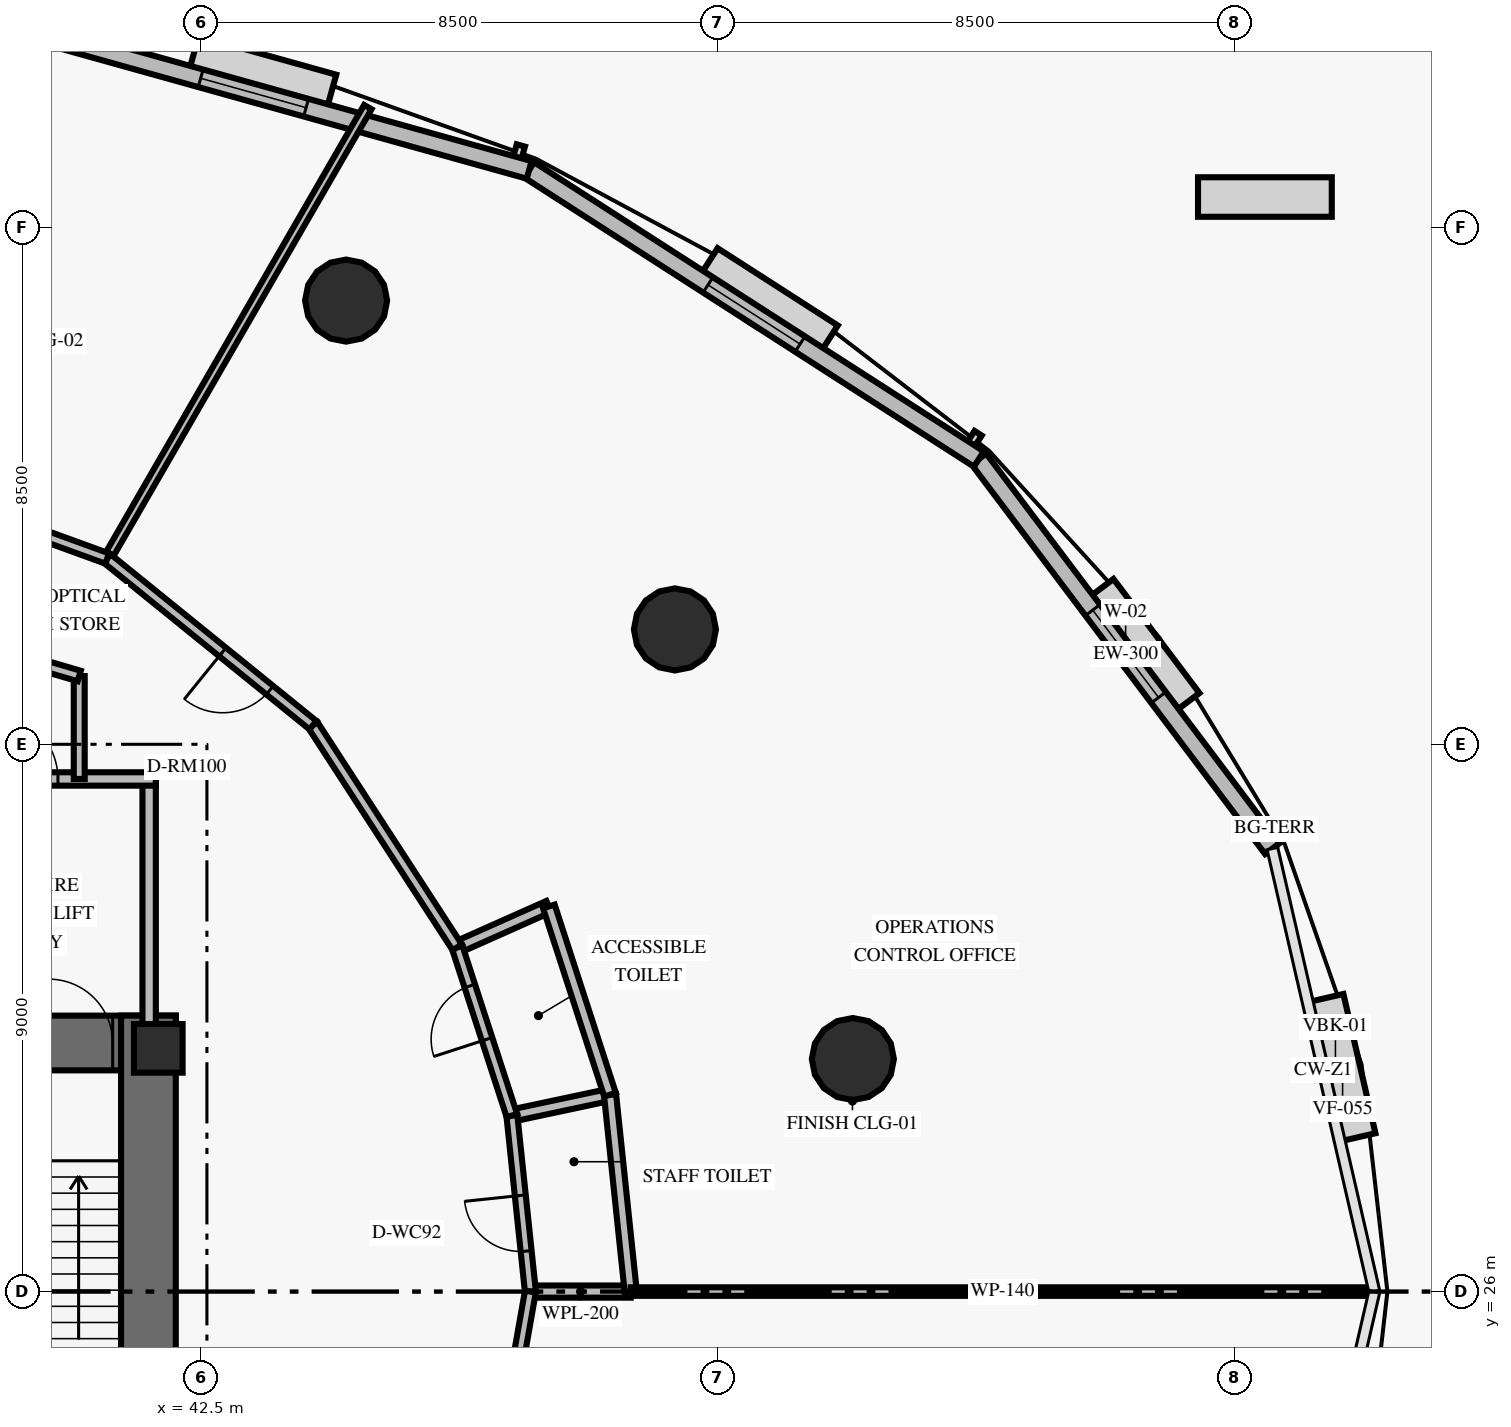
"""IFC4 building model, lengths in metres.
Left out: names, types, materials, properties, quantities, classifications, styles, units other than length and angle.
Written with IfcOpenShell. Run it as: python <this file> out.ifc"""

import sys

from ifc_helpers import new_model, si_unit, direction, frame, frame_2d, origin, origin_2d, place, context, subcontext, project, spatial, rectangle, circle, extrude, element, fill, save


model = new_model("IFC4")
c1 = context("Model", 3, precision=1e-05, world=origin(), true_north=direction((0.0, 1.0)))
c2 = subcontext(c1, "Body", "Model", "MODEL_VIEW")
j1 = project(units=[si_unit("LENGTHUNIT", "METRE"), si_unit("PLANEANGLEUNIT", "RADIAN")], contexts=[c1])
p1 = place(None, origin())
s1 = spatial("IfcSite", under=j1, at=p1, CompositionType="ELEMENT")
p2 = place(p1, origin())
s2 = spatial("IfcBuilding", under=s1, at=p2, CompositionType="ELEMENT")
p3 = place(p2, frame((0.0, 0.0, 30.0)))
s3 = spatial("IfcBuildingStorey", under=s2, at=p3, CompositionType="ELEMENT", Elevation=30.0)
p4 = place(p3, frame((25.922, 30.088, 0.0), z_axis=(0.0, 0.0, 1.0), x_axis=(1.0, 0.0, 0.0)))
e1 = element("IfcWall", 1, at=p4, inside=s3, PredefinedType="SHEAR", context=c2, shape_type="SweptSolid", body=[
    extrude(rectangle(XDim=16.166, YDim=0.9, at=frame_2d((8.083, 0.0))), origin(), (0.0, 0.0, 1.0), 4.2),
])
p5 = place(p4, frame((1.028, 0.0, 0.0)))
e2 = element("IfcOpeningElement", 2, at=p5, cuts=e1, PredefinedType="OPENING", context=c2, shape_type="SweptSolid", body=[
    extrude(rectangle(XDim=1.05, YDim=2.15, at=frame_2d((0.525, 1.075))), frame((0.0, 0.46, 0.0), z_axis=(0.0, -1.0, 0.0), x_axis=(1.0, 0.0, 0.0)), (0.0, 0.0, 1.0), 0.92),
])
p6 = place(p4, frame((14.078, 0.0, 0.0)))
e3 = element("IfcOpeningElement", 3, at=p6, cuts=e1, PredefinedType="OPENING", context=c2, shape_type="SweptSolid", body=[
    extrude(rectangle(XDim=1.05, YDim=2.15, at=frame_2d((0.525, 1.075))), frame((0.0, 0.46, 0.0), z_axis=(0.0, -1.0, 0.0), x_axis=(1.0, 0.0, 0.0)), (0.0, 0.0, 1.0), 0.92),
])
p7 = place(p4, frame((7.528, 0.0, 0.0)))
e4 = element("IfcOpeningElement", 4, at=p7, cuts=e1, PredefinedType="OPENING", context=c2, shape_type="SweptSolid", body=[
    extrude(rectangle(XDim=1.1, YDim=2.15, at=frame_2d((0.55, 1.075))), frame((0.0, 0.46, 0.0), z_axis=(0.0, -1.0, 0.0), x_axis=(1.0, 0.0, 0.0)), (0.0, 0.0, 1.0), 0.92),
])
p8 = place(p3, frame((41.638, 19.662, 0.0), z_axis=(0.0, 0.0, 1.0), x_axis=(0.0, 1.0, 0.0)))
e5 = element("IfcWall", 5, at=p8, inside=s3, PredefinedType="SHEAR", context=c2, shape_type="SweptSolid", body=[
    extrude(rectangle(XDim=10.876, YDim=0.9, at=frame_2d((5.438, 0.0))), origin(), (0.0, 0.0, 1.0), 4.2),
])
p9 = place(p3, frame((41.8, 30.0, 0.0), z_axis=(0.0, 0.0, 1.0), x_axis=(1.0, 0.0, 0.0)))
e6 = element("IfcColumn", 6, at=p9, inside=s3, PredefinedType="PILASTER", context=c2, shape_type="SweptSolid", body=[
    extrude(rectangle(XDim=0.8, YDim=0.8, at=origin_2d()), origin(), (0.0, 0.0, 1.0), 4.2),
])
for number, where, z_axis, x_axis in (
    (7, (53.223, 29.824, 0.0), (0.0, 0.0, 1.0), (1.0, 0.0, 0.0)),
    (8, (50.297, 36.889, 0.0), (0.0, 0.0, 1.0), (1.0, 0.0, 0.0)),
):
    element("IfcColumn", number, at=place(p3, frame(where, z_axis=z_axis, x_axis=x_axis)), inside=s3, PredefinedType="COLUMN", context=c2, shape_type="SweptSolid", body=[
        extrude(circle(Radius=0.675, at=origin_2d()), origin(), (0.0, 0.0, 1.0), 4.2),
    ])
p10 = place(p3, frame((44.889, 42.297, -0.28), z_axis=(0.0, 0.0, 1.0), x_axis=(1.0, 0.0, 0.0)))
e9 = element("IfcColumn", 9, at=p10, inside=s3, PredefinedType="COLUMN", context=c2, shape_type="SweptSolid", body=[
    extrude(circle(Radius=0.675, at=origin_2d()), origin(), (0.0, 0.0, 1.0), 4.48),
])
p11 = place(p3, frame((60.124, 33.285, 0.0), z_axis=(0.0, 0.0, 1.0), x_axis=(-0.601814793535, 0.798635683076, 0.0)))
e10 = element("IfcWall", 10, at=p11, inside=s3, PredefinedType="SOLIDWALL", context=c2, shape_type="SweptSolid", body=[
    extrude(rectangle(XDim=8.022, YDim=0.3, at=frame_2d((4.011, 0.0))), origin(), (0.0, 0.0, 1.0), 3.0),
])
p12 = place(p11, frame((3.111, 0.0, 0.8)))
e11 = element("IfcOpeningElement", 11, at=p12, cuts=e10, PredefinedType="OPENING", context=c2, shape_type="SweptSolid", body=[
    extrude(rectangle(XDim=1.8, YDim=1.95, at=frame_2d((0.9, 0.975))), frame((0.0, 0.16, 0.0), z_axis=(0.0, -1.0, 0.0), x_axis=(1.0, 0.0, 0.0)), (0.0, 0.0, 1.0), 0.32),
])
p13 = place(p3, frame((55.296, 39.691, 0.0), z_axis=(0.0, 0.0, 1.0), x_axis=(-0.841162236031, 0.540782851685, 0.0)))
e12 = element("IfcWall", 12, at=p13, inside=s3, PredefinedType="SOLIDWALL", context=c2, shape_type="SweptSolid", body=[
    extrude(rectangle(XDim=8.792, YDim=0.3, at=frame_2d((4.396, 0.0))), origin(), (0.0, 0.0, 1.0), 3.0),
])
p14 = place(p13, frame((3.496, 0.0, 0.8)))
e13 = element("IfcOpeningElement", 13, at=p14, cuts=e12, PredefinedType="OPENING", context=c2, shape_type="SweptSolid", body=[
    extrude(rectangle(XDim=1.8, YDim=1.95, at=frame_2d((0.9, 0.975))), frame((0.0, 0.16, 0.0), z_axis=(0.0, -1.0, 0.0), x_axis=(1.0, 0.0, 0.0)), (0.0, 0.0, 1.0), 0.32),
])
p15 = place(p3, frame((47.9, 44.446, 0.0), z_axis=(0.0, 0.0, 1.0), x_axis=(-0.963246695545, 0.268618323133, 0.0)))
e14 = element("IfcWall", 14, at=p15, inside=s3, PredefinedType="SOLIDWALL", context=c2, shape_type="SweptSolid", body=[
    extrude(rectangle(XDim=9.419, YDim=0.3, at=frame_2d((4.709, 0.0))), origin(), (0.0, 0.0, 1.0), 3.0),
])
p16 = place(p15, frame((3.809, 0.0, 0.8)))
e15 = element("IfcOpeningElement", 15, at=p16, cuts=e14, PredefinedType="OPENING", context=c2, shape_type="SweptSolid", body=[
    extrude(rectangle(XDim=1.8, YDim=1.95, at=frame_2d((0.9, 0.975))), frame((0.0, 0.16, 0.0), z_axis=(0.0, -1.0, 0.0), x_axis=(1.0, 0.0, 0.0)), (0.0, 0.0, 1.0), 0.32),
])
p17 = place(p3, frame((41.65, 30.05, 0.0), z_axis=(0.0, 0.0, 1.0), x_axis=(0.0, 1.0, 0.0)))
e16 = element("IfcWall", 16, at=p17, inside=s3, PredefinedType="SOLIDWALL", context=c2, shape_type="SweptSolid", body=[
    extrude(rectangle(XDim=4.38, YDim=0.22, at=frame_2d((2.19, 0.0))), origin(), (0.0, 0.0, 1.0), 2.67),
])
p18 = place(p3, frame((37.45, 34.43, 0.0), z_axis=(0.0, 0.0, 1.0), x_axis=(1.0, 0.0, 0.0)))
e17 = element("IfcWall", 17, at=p18, inside=s3, PredefinedType="SOLIDWALL", context=c2, shape_type="SweptSolid", body=[
    extrude(rectangle(XDim=4.31, YDim=0.22, at=frame_2d((2.155, 0.0))), origin(), (0.0, 0.0, 1.0), 2.67),
])
p19 = place(p18, frame((1.6, 0.0, 0.0)))
e18 = element("IfcOpeningElement", 18, at=p19, cuts=e17, PredefinedType="OPENING", context=c2, shape_type="SweptSolid", body=[
    extrude(rectangle(XDim=1.1, YDim=2.15, at=frame_2d((0.55, 1.075))), frame((0.0, 0.12, 0.0), z_axis=(0.0, -1.0, 0.0), x_axis=(1.0, 0.0, 0.0)), (0.0, 0.0, 1.0), 0.24),
])
p20 = place(p3, frame((40.5, 36.123, 0.0), z_axis=(0.0, 0.0, 1.0), x_axis=(0.0, -1.0, 0.0)))
e19 = element("IfcWall", 19, at=p20, inside=s3, PredefinedType="PARTITIONING", context=c2, shape_type="SweptSolid", body=[
    extrude(rectangle(XDim=1.693, YDim=0.18, at=frame_2d((0.846, 0.0))), origin(), (0.0, 0.0, 1.0), 2.67),
])
p21 = place(p3, frame((34.0, 38.03, 0.0), z_axis=(0.0, 0.0, 1.0), x_axis=(0.959546654541, -0.281549671923, 0.0)))
e20 = element("IfcWall", 20, at=p21, inside=s3, PredefinedType="PARTITIONING", context=c2, shape_type="SweptSolid", body=[
    extrude(rectangle(XDim=6.774, YDim=0.18, at=frame_2d((3.387, 0.0))), origin(), (0.0, 0.0, 1.0), 2.67),
])
p22 = place(p21, frame((2.837, 0.0, 0.0)))
e21 = element("IfcOpeningElement", 21, at=p22, cuts=e20, PredefinedType="OPENING", context=c2, shape_type="SweptSolid", body=[
    extrude(rectangle(XDim=1.1, YDim=2.15, at=frame_2d((0.55, 1.075))), frame((0.0, 0.1, 0.0), z_axis=(0.0, -1.0, 0.0), x_axis=(1.0, 0.0, 0.0)), (0.0, 0.0, 1.0), 0.2),
])
for number, where, z_axis, x_axis in (
    (22, (47.92, 26.0, 0.0), (0.0, 0.0, 1.0), (1.0, 0.0, 0.0)),
    (23, (47.616, 28.894, 0.0), (0.0, 0.0, 1.0), (0.978, 0.208, 0.0)),
):
    element("IfcWall", number, at=place(p3, frame(where, z_axis=z_axis, x_axis=x_axis)), inside=s3, PredefinedType="PLUMBINGWALL", context=c2, shape_type="SweptSolid", body=[
        extrude(rectangle(XDim=1.65, YDim=0.2, at=frame_2d((0.825, 0.0))), origin(), (0.0, 0.0, 1.0), 2.67),
    ])
p23 = place(p3, frame((49.57, 26.0, 0.0), z_axis=(0.0, 0.0, 1.0), x_axis=(-0.104552041268, 0.994519416938, 0.0)))
e24 = element("IfcWall", 24, at=p23, inside=s3, PredefinedType="PLUMBINGWALL", context=c2, shape_type="SweptSolid", body=[
    extrude(rectangle(XDim=3.255, YDim=0.2, at=frame_2d((1.627, 0.0))), origin(), (0.0, 0.0, 1.0), 2.67),
])
p24 = place(p3, frame((47.92, 26.0, 0.0), z_axis=(0.0, 0.0, 1.0), x_axis=(-0.104536296253, 0.994521072057, 0.0)))
e25 = element("IfcWall", 25, at=p24, inside=s3, PredefinedType="PARTITIONING", context=c2, shape_type="SweptSolid", body=[
    extrude(rectangle(XDim=2.91, YDim=0.18, at=frame_2d((1.455, 0.0))), origin(), (0.0, 0.0, 1.0), 2.67),
])
p25 = place(p24, frame((0.669, 0.0, 0.0)))
e26 = element("IfcOpeningElement", 26, at=p25, cuts=e25, PredefinedType="OPENING", context=c2, shape_type="SweptSolid", body=[
    extrude(rectangle(XDim=0.92, YDim=2.1, at=frame_2d((0.46, 1.05))), frame((0.0, 0.1, 0.0), z_axis=(0.0, -1.0, 0.0), x_axis=(1.0, 0.0, 0.0)), (0.0, 0.0, 1.0), 0.2),
])
p26 = place(p3, frame((46.717, 31.662, 0.0), z_axis=(0.0, 0.0, 1.0), x_axis=(0.913536765304, 0.406756165828, 0.0)))
e27 = element("IfcWall", 27, at=p26, inside=s3, PredefinedType="PLUMBINGWALL", context=c2, shape_type="SweptSolid", body=[
    extrude(rectangle(XDim=1.65, YDim=0.2, at=frame_2d((0.825, 0.0))), origin(), (0.0, 0.0, 1.0), 2.67),
])
p27 = place(p3, frame((49.23, 29.237, 0.0), z_axis=(0.0, 0.0, 1.0), x_axis=(-0.309018232614, 0.951056113966, 0.0)))
e28 = element("IfcWall", 28, at=p27, inside=s3, PredefinedType="PLUMBINGWALL", context=c2, shape_type="SweptSolid", body=[
    extrude(rectangle(XDim=3.255, YDim=0.2, at=frame_2d((1.627, 0.0))), origin(), (0.0, 0.0, 1.0), 2.67),
])
p28 = place(p3, frame((47.616, 28.894, 0.0), z_axis=(0.0, 0.0, 1.0), x_axis=(-0.308970358399, 0.951071667978, 0.0)))
e29 = element("IfcWall", 29, at=p28, inside=s3, PredefinedType="PARTITIONING", context=c2, shape_type="SweptSolid", body=[
    extrude(rectangle(XDim=2.91, YDim=0.18, at=frame_2d((1.455, 0.0))), origin(), (0.0, 0.0, 1.0), 2.67),
])
p29 = place(p28, frame((1.321, 0.0, 0.0)))
e30 = element("IfcOpeningElement", 30, at=p29, cuts=e29, PredefinedType="OPENING", context=c2, shape_type="SweptSolid", body=[
    extrude(rectangle(XDim=0.92, YDim=2.1, at=frame_2d((0.46, 1.05))), frame((0.0, 0.1, 0.0), z_axis=(0.0, -1.0, 0.0), x_axis=(1.0, 0.0, 0.0)), (0.0, 0.0, 1.0), 0.2),
])
p30 = place(p3, frame((49.57, 26.0, 0.0), z_axis=(0.0, 0.0, 1.0), x_axis=(1.0, 0.0, 0.0)))
e31 = element("IfcWall", 31, at=p30, inside=s3, PredefinedType="PARTITIONING", context=c2, shape_type="SweptSolid", body=[
    extrude(rectangle(XDim=12.23, YDim=0.14, at=frame_2d((6.115, 0.0))), origin(), (0.0, 0.0, 1.0), 2.67),
])
p31 = place(p3, frame((40.96, 38.055, 0.0), z_axis=(0.0, 0.0, 1.0), x_axis=(0.500007596729, 0.866021017767, 0.0)))
e32 = element("IfcWall", 32, at=p31, inside=s3, PredefinedType="PARTITIONING", context=c2, shape_type="SweptSolid", body=[
    extrude(rectangle(XDim=8.573, YDim=0.14, at=frame_2d((4.286, 0.0))), origin(), (0.0, 0.0, 1.0), 2.67),
])
p32 = place(p3, frame((46.717, 31.662, 0.0), z_axis=(0.0, 0.0, 1.0), x_axis=(-0.544673039571, 0.838648484148, 0.0)))
e33 = element("IfcWall", 33, at=p32, inside=s3, PredefinedType="PARTITIONING", context=c2, shape_type="SweptSolid", body=[
    extrude(rectangle(XDim=4.355, YDim=0.18, at=frame_2d((2.177, 0.0))), origin(), (0.0, 0.0, 1.0), 2.67),
])
p33 = place(p3, frame((44.344, 35.314, 0.0), z_axis=(0.0, 0.0, 1.0), x_axis=(-0.777119533123, 0.629353025923, 0.0)))
e34 = element("IfcWall", 34, at=p33, inside=s3, PredefinedType="PARTITIONING", context=c2, shape_type="SweptSolid", body=[
    extrude(rectangle(XDim=4.355, YDim=0.18, at=frame_2d((2.178, 0.0))), origin(), (0.0, 0.0, 1.0), 2.67),
])
p34 = place(p33, frame((0.914, 0.0, 0.0)))
e35 = element("IfcOpeningElement", 35, at=p34, cuts=e34, PredefinedType="OPENING", context=c2, shape_type="SweptSolid", body=[
    extrude(rectangle(XDim=1.0, YDim=2.15, at=frame_2d((0.5, 1.075))), frame((0.0, 0.1, 0.0), z_axis=(0.0, -1.0, 0.0), x_axis=(1.0, 0.0, 0.0)), (0.0, 0.0, 1.0), 0.2),
])
p35 = place(p3, frame((40.96, 38.055, 0.0), z_axis=(0.0, 0.0, 1.0), x_axis=(-0.939699018122, 0.342002566277, 0.0)))
e36 = element("IfcWall", 36, at=p35, inside=s3, PredefinedType="PARTITIONING", context=c2, shape_type="SweptSolid", body=[
    extrude(rectangle(XDim=4.834, YDim=0.18, at=frame_2d((2.417, 0.0))), origin(), (0.0, 0.0, 1.0), 2.67),
])
p36 = place(p3, frame((47.081, 21.239, 0.0), z_axis=(0.0, 0.0, 1.0), x_axis=(0.173621119757, 0.984812523669, 0.0)))
e37 = element("IfcWall", 37, at=p36, inside=s3, PredefinedType="PARTITIONING", context=c2, shape_type="SweptSolid", body=[
    extrude(rectangle(XDim=4.834, YDim=0.18, at=frame_2d((2.417, 0.0))), origin(), (0.0, 0.0, 1.0), 2.67),
])
p37 = place(p12, origin())
e38 = element("IfcWindow", 38, at=p37, inside=s3, PartitioningType="SINGLE_PANEL", PredefinedType="WINDOW", context=c2, shape_type="SweptSolid", body=[
    extrude(rectangle(XDim=1.8, YDim=1.95, at=frame_2d((0.9, 0.975))), frame((0.0, 0.03, 0.0), z_axis=(0.0, -1.0, 0.0), x_axis=(1.0, 0.0, 0.0)), (0.0, 0.0, 1.0), 0.06),
])
fill(e11, e38)
p38 = place(p14, origin())
e39 = element("IfcWindow", 39, at=p38, inside=s3, PartitioningType="SINGLE_PANEL", PredefinedType="WINDOW", context=c2, shape_type="SweptSolid", body=[
    extrude(rectangle(XDim=1.8, YDim=1.95, at=frame_2d((0.9, 0.975))), frame((0.0, 0.03, 0.0), z_axis=(0.0, -1.0, 0.0), x_axis=(1.0, 0.0, 0.0)), (0.0, 0.0, 1.0), 0.06),
])
fill(e13, e39)
p39 = place(p16, origin())
e40 = element("IfcWindow", 40, at=p39, inside=s3, PartitioningType="SINGLE_PANEL", PredefinedType="WINDOW", context=c2, shape_type="SweptSolid", body=[
    extrude(rectangle(XDim=1.8, YDim=1.95, at=frame_2d((0.9, 0.975))), frame((0.0, 0.03, 0.0), z_axis=(0.0, -1.0, 0.0), x_axis=(1.0, 0.0, 0.0)), (0.0, 0.0, 1.0), 0.06),
])
fill(e15, e40)
p40 = place(p6, origin())
e41 = element("IfcDoor", 41, at=p40, inside=s3, OperationType="SINGLE_SWING_LEFT", PredefinedType="DOOR", context=c2, shape_type="SweptSolid", body=[
    extrude(rectangle(XDim=1.05, YDim=2.15, at=frame_2d((0.525, 1.075))), frame((0.0, 0.025, 0.0), z_axis=(0.0, -1.0, 0.0), x_axis=(1.0, 0.0, 0.0)), (0.0, 0.0, 1.0), 0.05),
])
fill(e3, e41)
p41 = place(p19, origin())
e42 = element("IfcDoor", 42, at=p41, inside=s3, OperationType="SINGLE_SWING_LEFT", PredefinedType="DOOR", context=c2, shape_type="SweptSolid", body=[
    extrude(rectangle(XDim=1.1, YDim=2.15, at=frame_2d((0.55, 1.075))), frame((0.0, 0.025, 0.0), z_axis=(0.0, -1.0, 0.0), x_axis=(1.0, 0.0, 0.0)), (0.0, 0.0, 1.0), 0.05),
])
fill(e18, e42)
p42 = place(p25, origin())
e43 = element("IfcDoor", 43, at=p42, inside=s3, OperationType="SINGLE_SWING_RIGHT", PredefinedType="DOOR", context=c2, shape_type="SweptSolid", body=[
    extrude(rectangle(XDim=0.92, YDim=2.1, at=frame_2d((0.46, 1.05))), frame((0.0, 0.025, 0.0), z_axis=(0.0, -1.0, 0.0), x_axis=(1.0, 0.0, 0.0)), (0.0, 0.0, 1.0), 0.05),
])
fill(e26, e43)
p43 = place(p29, origin())
e44 = element("IfcDoor", 44, at=p43, inside=s3, OperationType="SINGLE_SWING_LEFT", PredefinedType="DOOR", context=c2, shape_type="SweptSolid", body=[
    extrude(rectangle(XDim=0.92, YDim=2.1, at=frame_2d((0.46, 1.05))), frame((0.0, 0.025, 0.0), z_axis=(0.0, -1.0, 0.0), x_axis=(1.0, 0.0, 0.0)), (0.0, 0.0, 1.0), 0.05),
])
fill(e30, e44)
p44 = place(p34, origin())
e45 = element("IfcDoor", 45, at=p44, inside=s3, OperationType="SINGLE_SWING_RIGHT", PredefinedType="DOOR", context=c2, shape_type="SweptSolid", body=[
    extrude(rectangle(XDim=1.0, YDim=2.15, at=frame_2d((0.5, 1.075))), frame((0.0, 0.025, 0.0), z_axis=(0.0, -1.0, 0.0), x_axis=(1.0, 0.0, 0.0)), (0.0, 0.0, 1.0), 0.05),
])
fill(e35, e45)
save(model, sys.argv[1])
